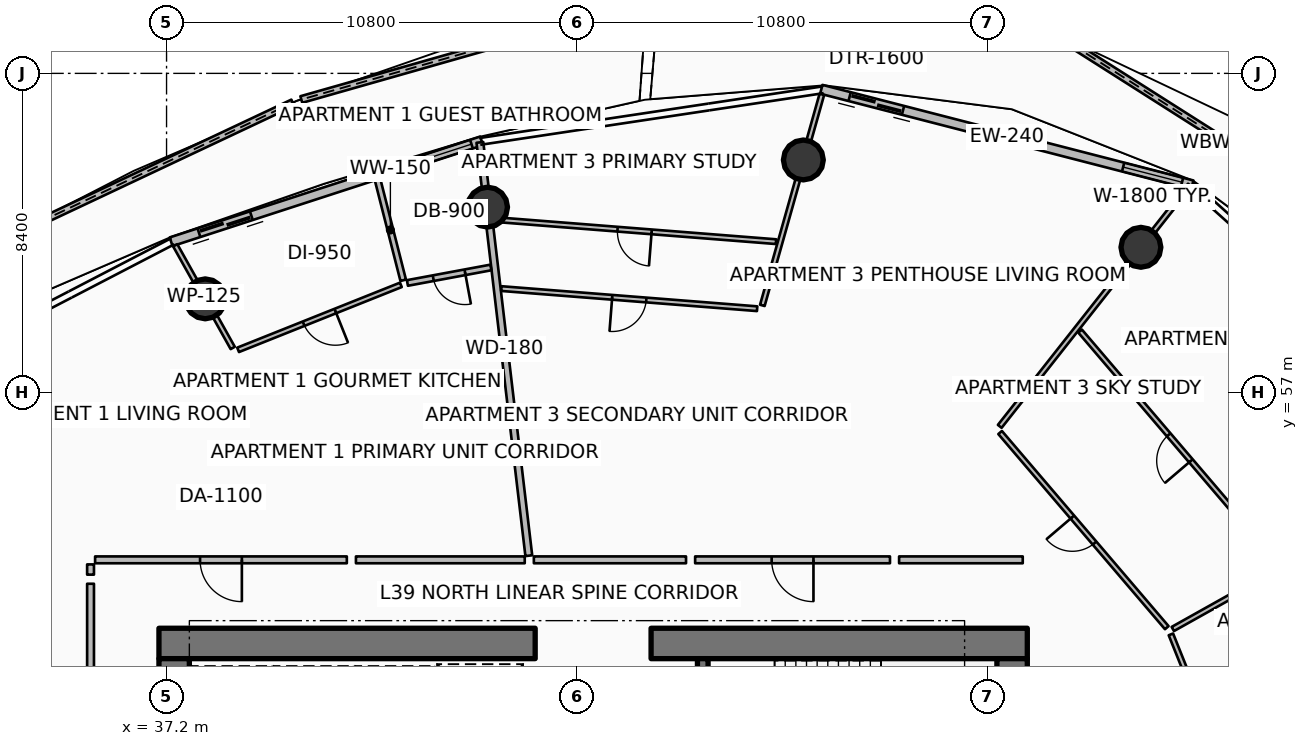
"""IFC4 building model, lengths in metres.
Left out: names, types, materials, properties, quantities, classifications, styles, units other than length and angle.
Written with IfcOpenShell. Run it as: python <this file> out.ifc"""

import sys

from ifc_helpers import new_model, si_unit, direction, frame, frame_2d, origin, origin_2d, place, context, subcontext, project, spatial, polyline, rectangle, circle, outline, extrude, element, fill, save


model = new_model("IFC4")
c1 = context("Model", 3, precision=1e-05, world=origin(), true_north=direction((0.0, 1.0)))
c2 = subcontext(c1, "Body", "Model", "MODEL_VIEW")
j1 = project(units=[si_unit("LENGTHUNIT", "METRE"), si_unit("PLANEANGLEUNIT", "RADIAN")], contexts=[c1])
p1 = place(None, origin())
s1 = spatial("IfcSite", under=j1, at=p1, CompositionType="ELEMENT")
p2 = place(p1, origin())
s2 = spatial("IfcBuilding", under=s1, at=p2, CompositionType="ELEMENT")
p3 = place(p2, frame((0.0, 0.0, 157.8)))
s3 = spatial("IfcBuildingStorey", under=s2, at=p3, CompositionType="ELEMENT", Elevation=157.8)
p4 = place(p3, frame((37.0, 50.4, 0.0), z_axis=(0.0, 0.0, 1.0), x_axis=(1.0, 0.0, 0.0)))
e1 = element("IfcWall", 1, at=p4, inside=s3, PredefinedType="SHEAR", context=c2, shape_type="SweptSolid", body=[
    extrude(rectangle(XDim=9.9, YDim=0.8, at=frame_2d((4.95, 0.0))), origin(), (0.0, 0.0, 1.0), 3.75),
])
p5 = place(p3, frame((49.95, 50.4, 0.0), z_axis=(0.0, 0.0, 1.0), x_axis=(1.0, 0.0, 0.0)))
e2 = element("IfcWall", 2, at=p5, inside=s3, PredefinedType="SHEAR", context=c2, shape_type="SweptSolid", body=[
    extrude(rectangle(XDim=9.9, YDim=0.8, at=frame_2d((4.95, 0.0))), origin(), (0.0, 0.0, 1.0), 3.75),
])
for number, where, z_axis, x_axis in (
    (3, (37.4, 34.0, 0.0), (0.0, 0.0, 1.0), (0.0, 1.0, 0.0)),
    (4, (59.45, 34.0, 0.0), (0.0, 0.0, 1.0), (0.0, 1.0, 0.0)),
):
    element("IfcWall", number, at=place(p3, frame(where, z_axis=z_axis, x_axis=x_axis)), inside=s3, PredefinedType="SHEAR", context=c2, shape_type="SweptSolid", body=[
        extrude(rectangle(XDim=16.0, YDim=0.8, at=frame_2d((8.0, 0.0))), origin(), (0.0, 0.0, 1.0), 3.75),
    ])
p6 = place(p3, frame((51.31, 46.5, 0.0), z_axis=(0.0, 0.0, 1.0), x_axis=(0.0, 1.0, 0.0)))
e5 = element("IfcWall", 5, at=p6, inside=s3, PredefinedType="SHEAR", context=c2, shape_type="SweptSolid", body=[
    extrude(rectangle(XDim=3.5, YDim=0.28, at=frame_2d((1.75, 0.0))), origin(), (0.0, 0.0, 1.0), 3.75),
])
for number, where, z_axis, x_axis in (
    (6, (62.84, 60.824, 0.0), (0.0, 0.0, 1.0), (1.0, 0.0, 0.0)),
    (7, (53.957, 63.122, 0.0), (0.0, 0.0, 1.0), (1.0, 0.0, 0.0)),
    (8, (45.647, 61.881, 0.0), (0.0, 0.0, 1.0), (1.0, 0.0, 0.0)),
    (9, (38.218, 59.467, 0.0), (0.0, 0.0, 1.0), (1.0, 0.0, 0.0)),
):
    element("IfcColumn", number, at=place(p3, frame(where, z_axis=z_axis, x_axis=x_axis)), inside=s3, PredefinedType="COLUMN", context=c2, shape_type="SweptSolid", body=[
        extrude(circle(Radius=0.525, at=origin_2d()), origin(), (0.0, 0.0, 1.0), 3.5),
    ])
p7 = place(p3, frame((69.624, 60.698, 0.0), z_axis=(0.0, 0.0, 1.0), x_axis=(-0.844049978771, 0.536264518066, 0.0)))
e10 = element("IfcWall", 10, at=p7, inside=s3, PredefinedType="PARAPET", context=c2, shape_type="SweptSolid", body=[
    extrude(outline(polyline([(0.0, 0.0), (10.707, 0.0), (10.707, 1.632), (5.353, 1.418), (0.0, 1.233), (0.0, 0.0)])), frame((0.0, 0.09, 0.0), z_axis=(0.0, -1.0, 0.0), x_axis=(1.0, 0.0, 0.0)), (0.0, 0.0, 1.0), 0.18),
])
p8 = place(p3, frame((49.835, 67.296, 0.0), z_axis=(0.0, 0.0, 1.0), x_axis=(-0.961897452062, -0.27341048209, 0.0)))
e11 = element("IfcWall", 11, at=p8, inside=s3, PredefinedType="PARAPET", context=c2, shape_type="SweptSolid", body=[
    extrude(outline(polyline([(0.0, 0.0), (9.449, 0.0), (9.449, 1.632), (4.725, 1.798), (0.0, 1.86), (0.0, 0.0)])), frame((0.0, 0.09, 0.0), z_axis=(0.0, -1.0, 0.0), x_axis=(1.0, 0.0, 0.0)), (0.0, 0.0, 1.0), 0.18),
])
p9 = place(p3, frame((40.522, 64.628, 0.0), z_axis=(0.0, 0.0, 1.0), x_axis=(-0.904569140233, -0.42632695263, 0.0)))
e12 = element("IfcWall", 12, at=p9, inside=s3, PredefinedType="PARAPET", context=c2, shape_type="SweptSolid", body=[
    extrude(outline(polyline([(0.0, 0.0), (9.184, 0.0), (9.184, 1.233), (4.592, 1.418), (0.0, 1.632), (0.0, 0.0)])), frame((0.0, 0.09, 0.0), z_axis=(0.0, -1.0, 0.0), x_axis=(1.0, 0.0, 0.0)), (0.0, 0.0, 1.0), 0.18),
])
p10 = place(p3, frame((64.192, 62.466, 0.0), z_axis=(0.0, 0.0, 1.0), x_axis=(-0.968379685126, 0.249481032214, 0.0)))
e13 = element("IfcWall", 13, at=p10, inside=s3, PredefinedType="SOLIDWALL", context=c2, shape_type="SweptSolid", body=[
    extrude(rectangle(XDim=10.082, YDim=0.24, at=frame_2d((5.041, 0.0))), origin(), (0.0, 0.0, 1.0), 2.45),
])
p11 = place(p10, frame((7.862, 0.0, 0.0)))
e14 = element("IfcOpeningElement", 14, at=p11, cuts=e13, PredefinedType="OPENING", context=c2, shape_type="SweptSolid", body=[
    extrude(rectangle(XDim=1.45, YDim=2.15, at=frame_2d((0.725, 1.075))), frame((0.0, 0.13, 0.0), z_axis=(0.0, -1.0, 0.0), x_axis=(1.0, 0.0, 0.0)), (0.0, 0.0, 1.0), 0.26),
])
p12 = place(p10, frame((0.28, 0.0, 0.65)))
e15 = element("IfcOpeningElement", 15, at=p12, cuts=e13, PredefinedType="OPENING", context=c2, shape_type="SweptSolid", body=[
    extrude(rectangle(XDim=1.6, YDim=1.5, at=frame_2d((0.8, 0.75))), frame((0.0, 0.13, 0.0), z_axis=(0.0, -1.0, 0.0), x_axis=(1.0, 0.0, 0.0)), (0.0, 0.0, 1.0), 0.26),
])
p13 = place(p3, frame((45.49, 63.624, 0.0), z_axis=(0.0, 0.0, 1.0), x_axis=(-0.951046390632, -0.309048156224, 0.0)))
e16 = element("IfcWall", 16, at=p13, inside=s3, PredefinedType="SOLIDWALL", context=c2, shape_type="SweptSolid", body=[
    extrude(rectangle(XDim=8.59, YDim=0.24, at=frame_2d((4.295, 0.0))), origin(), (0.0, 0.0, 1.0), 2.45),
])
p14 = place(p13, frame((6.37, 0.0, 0.0)))
e17 = element("IfcOpeningElement", 17, at=p14, cuts=e16, PredefinedType="OPENING", context=c2, shape_type="SweptSolid", body=[
    extrude(rectangle(XDim=1.45, YDim=2.15, at=frame_2d((0.725, 1.075))), frame((0.0, 0.13, 0.0), z_axis=(0.0, -1.0, 0.0), x_axis=(1.0, 0.0, 0.0)), (0.0, 0.0, 1.0), 0.26),
])
p15 = place(p13, frame((0.28, 0.0, 0.65)))
e18 = element("IfcOpeningElement", 18, at=p15, cuts=e16, PredefinedType="OPENING", context=c2, shape_type="SweptSolid", body=[
    extrude(rectangle(XDim=1.6, YDim=1.5, at=frame_2d((0.8, 0.75))), frame((0.0, 0.13, 0.0), z_axis=(0.0, -1.0, 0.0), x_axis=(1.0, 0.0, 0.0)), (0.0, 0.0, 1.0), 0.26),
])
p16 = place(p3, frame((46.732, 52.709, 0.0), z_axis=(0.0, 0.0, 1.0), x_axis=(-0.117537145285, 0.993068486802, 0.0)))
e19 = element("IfcWall", 19, at=p16, inside=s3, PredefinedType="PARTITIONING", context=c2, shape_type="SweptSolid", body=[
    extrude(rectangle(XDim=10.951, YDim=0.18, at=frame_2d((5.475, 0.0))), origin(), (0.0, 0.0, 1.0), 2.94),
])
p17 = place(p3, frame((41.944, 52.6, 0.0), z_axis=(0.0, 0.0, 1.0), x_axis=(-1.0, 0.0, 0.0)))
e20 = element("IfcWall", 20, at=p17, inside=s3, PredefinedType="PARTITIONING", context=c2, shape_type="SweptSolid", body=[
    extrude(rectangle(XDim=6.624, YDim=0.18, at=frame_2d((3.312, 0.0))), origin(), (0.0, 0.0, 1.0), 2.94),
])
p18 = place(p17, frame((2.762, 0.0, 0.0)))
e21 = element("IfcOpeningElement", 21, at=p18, cuts=e20, PredefinedType="OPENING", context=c2, shape_type="SweptSolid", body=[
    extrude(rectangle(XDim=1.1, YDim=2.1, at=frame_2d((0.55, 1.05))), frame((0.0, 0.1, 0.0), z_axis=(0.0, -1.0, 0.0), x_axis=(1.0, 0.0, 0.0)), (0.0, 0.0, 1.0), 0.2),
])
p19 = place(p3, frame((35.2, 52.48, 0.0), z_axis=(0.0, 0.0, 1.0), x_axis=(0.0, -1.0, 0.0)))
e22 = element("IfcWall", 22, at=p19, inside=s3, PredefinedType="PARTITIONING", context=c2, shape_type="SweptSolid", body=[
    extrude(rectangle(XDim=0.269, YDim=0.18, at=frame_2d((0.135, 0.0))), origin(), (0.0, 0.0, 1.0), 2.94),
])
p20 = place(p3, frame((46.625, 52.6, 0.0), z_axis=(0.0, 0.0, 1.0), x_axis=(-1.0, 0.0, 0.0)))
e23 = element("IfcWall", 23, at=p20, inside=s3, PredefinedType="PARTITIONING", context=c2, shape_type="SweptSolid", body=[
    extrude(rectangle(XDim=4.442, YDim=0.18, at=frame_2d((2.221, 0.0))), origin(), (0.0, 0.0, 1.0), 2.94),
])
p21 = place(p3, frame((38.941, 58.175, 0.0), z_axis=(0.0, 0.0, 1.0), x_axis=(-0.488620181058, 0.872496600946, 0.0)))
e24 = element("IfcWall", 24, at=p21, inside=s3, PredefinedType="PARTITIONING", context=c2, shape_type="SweptSolid", body=[
    extrude(rectangle(XDim=3.095, YDim=0.125, at=frame_2d((1.548, 0.0))), origin(), (0.0, 0.0, 1.0), 2.94),
])
p22 = place(p3, frame((45.734, 60.293, 0.0), z_axis=(0.0, 0.0, 1.0), x_axis=(-0.983182569162, -0.182625397184, 0.0)))
e25 = element("IfcWall", 25, at=p22, inside=s3, PredefinedType="PARTITIONING", context=c2, shape_type="SweptSolid", body=[
    extrude(rectangle(XDim=2.234, YDim=0.15, at=frame_2d((1.117, 0.0))), origin(), (0.0, 0.0, 1.0), 2.94),
])
p23 = place(p22, frame((0.692, 0.0, 0.0)))
e26 = element("IfcOpeningElement", 26, at=p23, cuts=e25, PredefinedType="OPENING", context=c2, shape_type="SweptSolid", body=[
    extrude(rectangle(XDim=0.85, YDim=2.06, at=frame_2d((0.425, 1.03))), frame((0.0, 0.085, 0.0), z_axis=(0.0, -1.0, 0.0), x_axis=(1.0, 0.0, 0.0)), (0.0, 0.0, 1.0), 0.17),
])
p24 = place(p3, frame((43.427, 59.956, 0.0), z_axis=(0.0, 0.0, 1.0), x_axis=(-0.246779972966, 0.969071537578, 0.0)))
e27 = element("IfcWall", 27, at=p24, inside=s3, PredefinedType="PARTITIONING", context=c2, shape_type="SweptSolid", body=[
    extrude(rectangle(XDim=2.732, YDim=0.15, at=frame_2d((1.366, 0.0))), origin(), (0.0, 0.0, 1.0), 2.94),
])
p25 = place(p3, frame((43.366, 59.835, 0.0), z_axis=(0.0, 0.0, 1.0), x_axis=(-0.928691950022, -0.370852075584, 0.0)))
e28 = element("IfcWall", 28, at=p25, inside=s3, PredefinedType="PARTITIONING", context=c2, shape_type="SweptSolid", body=[
    extrude(rectangle(XDim=4.612, YDim=0.125, at=frame_2d((2.306, 0.0))), origin(), (0.0, 0.0, 1.0), 2.94),
])
p26 = place(p25, frame((1.856, 0.0, 0.0)))
e29 = element("IfcOpeningElement", 29, at=p26, cuts=e28, PredefinedType="OPENING", context=c2, shape_type="SweptSolid", body=[
    extrude(rectangle(XDim=0.9, YDim=2.08, at=frame_2d((0.45, 1.04))), frame((0.0, 0.073, 0.0), z_axis=(0.0, -1.0, 0.0), x_axis=(1.0, 0.0, 0.0)), (0.0, 0.0, 1.0), 0.145),
])
p27 = place(p3, frame((35.2, 51.971, 0.0), z_axis=(0.0, 0.0, 1.0), x_axis=(0.0, -1.0, 0.0)))
e30 = element("IfcWall", 30, at=p27, inside=s3, PredefinedType="PARTITIONING", context=c2, shape_type="SweptSolid", body=[
    extrude(rectangle(XDim=6.241, YDim=0.18, at=frame_2d((3.12, 0.0))), origin(), (0.0, 0.0, 1.0), 2.94),
])
p28 = place(p3, frame((56.236, 52.6, 0.0), z_axis=(0.0, 0.0, 1.0), x_axis=(-1.0, 0.0, 0.0)))
e31 = element("IfcWall", 31, at=p28, inside=s3, PredefinedType="PARTITIONING", context=c2, shape_type="SweptSolid", body=[
    extrude(rectangle(XDim=5.127, YDim=0.18, at=frame_2d((2.563, 0.0))), origin(), (0.0, 0.0, 1.0), 2.94),
])
p29 = place(p28, frame((2.013, 0.0, 0.0)))
e32 = element("IfcOpeningElement", 32, at=p29, cuts=e31, PredefinedType="OPENING", context=c2, shape_type="SweptSolid", body=[
    extrude(rectangle(XDim=1.1, YDim=2.1, at=frame_2d((0.55, 1.05))), frame((0.0, 0.1, 0.0), z_axis=(0.0, -1.0, 0.0), x_axis=(1.0, 0.0, 0.0)), (0.0, 0.0, 1.0), 0.2),
])
p30 = place(p3, frame((65.275, 46.532, 0.0), z_axis=(0.0, 0.0, 1.0), x_axis=(-0.372161107737, 0.928168147421, 0.0)))
e33 = element("IfcWall", 33, at=p30, inside=s3, PredefinedType="PARTITIONING", context=c2, shape_type="SweptSolid", body=[
    extrude(rectangle(XDim=4.425, YDim=0.125, at=frame_2d((2.212, 0.0))), origin(), (0.0, 0.0, 1.0), 2.94),
])
p31 = place(p30, frame((1.762, 0.0, 0.0)))
e34 = element("IfcOpeningElement", 34, at=p31, cuts=e33, PredefinedType="OPENING", context=c2, shape_type="SweptSolid", body=[
    extrude(rectangle(XDim=0.9, YDim=2.08, at=frame_2d((0.45, 1.04))), frame((0.0, 0.073, 0.0), z_axis=(0.0, -1.0, 0.0), x_axis=(1.0, 0.0, 0.0)), (0.0, 0.0, 1.0), 0.145),
])
p32 = place(p3, frame((59.73, 52.6, 0.0), z_axis=(0.0, 0.0, 1.0), x_axis=(-1.0, 0.0, 0.0)))
e35 = element("IfcWall", 35, at=p32, inside=s3, PredefinedType="PARTITIONING", context=c2, shape_type="SweptSolid", body=[
    extrude(rectangle(XDim=3.254, YDim=0.18, at=frame_2d((1.627, 0.0))), origin(), (0.0, 0.0, 1.0), 2.94),
])
p33 = place(p3, frame((63.679, 50.781, 0.0), z_axis=(0.0, 0.0, 1.0), x_axis=(0.872493265844, 0.488626136281, 0.0)))
e36 = element("IfcWall", 36, at=p33, inside=s3, PredefinedType="PARTITIONING", context=c2, shape_type="SweptSolid", body=[
    extrude(rectangle(XDim=8.816, YDim=0.125, at=frame_2d((4.408, 0.0))), origin(), (0.0, 0.0, 1.0), 2.94),
])
p34 = place(p3, frame((59.125, 56.112, 0.0), z_axis=(0.0, 0.0, 1.0), x_axis=(0.61910151414, 0.78531096719, 0.0)))
e37 = element("IfcWall", 37, at=p34, inside=s3, PredefinedType="PARTITIONING", context=c2, shape_type="SweptSolid", body=[
    extrude(rectangle(XDim=8.082, YDim=0.125, at=frame_2d((4.041, 0.0))), origin(), (0.0, 0.0, 1.0), 2.94),
])
p35 = place(p3, frame((63.52, 50.815, 0.0), z_axis=(0.0, 0.0, 1.0), x_axis=(-0.649447526186, 0.760406411553, 0.0)))
e38 = element("IfcWall", 38, at=p35, inside=s3, PredefinedType="PARTITIONING", context=c2, shape_type="SweptSolid", body=[
    extrude(rectangle(XDim=6.753, YDim=0.125, at=frame_2d((3.376, 0.0))), origin(), (0.0, 0.0, 1.0), 2.94),
])
p36 = place(p35, frame((2.926, 0.0, 0.0)))
e39 = element("IfcOpeningElement", 39, at=p36, cuts=e38, PredefinedType="OPENING", context=c2, shape_type="SweptSolid", body=[
    extrude(rectangle(XDim=0.9, YDim=2.08, at=frame_2d((0.45, 1.04))), frame((0.0, 0.073, 0.0), z_axis=(0.0, -1.0, 0.0), x_axis=(1.0, 0.0, 0.0)), (0.0, 0.0, 1.0), 0.145),
])
p37 = place(p3, frame((66.486, 52.476, 0.0), z_axis=(0.0, 0.0, 1.0), x_axis=(-0.649426515446, 0.760424355894, 0.0)))
e40 = element("IfcWall", 40, at=p37, inside=s3, PredefinedType="PARTITIONING", context=c2, shape_type="SweptSolid", body=[
    extrude(rectangle(XDim=8.079, YDim=0.125, at=frame_2d((4.04, 0.0))), origin(), (0.0, 0.0, 1.0), 2.94),
])
p38 = place(p37, frame((3.589, 0.0, 0.0)))
e41 = element("IfcOpeningElement", 41, at=p38, cuts=e40, PredefinedType="OPENING", context=c2, shape_type="SweptSolid", body=[
    extrude(rectangle(XDim=0.9, YDim=2.08, at=frame_2d((0.45, 1.04))), frame((0.0, 0.073, 0.0), z_axis=(0.0, -1.0, 0.0), x_axis=(1.0, 0.0, 0.0)), (0.0, 0.0, 1.0), 0.145),
])
p39 = place(p3, frame((50.869, 52.6, 0.0), z_axis=(0.0, 0.0, 1.0), x_axis=(-1.0, 0.0, 0.0)))
e42 = element("IfcWall", 42, at=p39, inside=s3, PredefinedType="PARTITIONING", context=c2, shape_type="SweptSolid", body=[
    extrude(rectangle(XDim=4.004, YDim=0.18, at=frame_2d((2.002, 0.0))), origin(), (0.0, 0.0, 1.0), 2.94),
])
p40 = place(p3, frame((52.878, 59.295, 0.0), z_axis=(0.0, 0.0, 1.0), x_axis=(0.271461170106, 0.962449392501, 0.0)))
e43 = element("IfcWall", 43, at=p40, inside=s3, PredefinedType="PARTITIONING", context=c2, shape_type="SweptSolid", body=[
    extrude(rectangle(XDim=5.769, YDim=0.125, at=frame_2d((2.885, 0.0))), origin(), (0.0, 0.0, 1.0), 2.94),
])
p41 = place(p3, frame((52.741, 59.208, 0.0), z_axis=(0.0, 0.0, 1.0), x_axis=(-0.996917452966, 0.078457580711, 0.0)))
e44 = element("IfcWall", 44, at=p41, inside=s3, PredefinedType="PARTITIONING", context=c2, shape_type="SweptSolid", body=[
    extrude(rectangle(XDim=6.752, YDim=0.125, at=frame_2d((3.376, 0.0))), origin(), (0.0, 0.0, 1.0), 2.94),
])
p42 = place(p41, frame((2.926, 0.0, 0.0)))
e45 = element("IfcOpeningElement", 45, at=p42, cuts=e44, PredefinedType="OPENING", context=c2, shape_type="SweptSolid", body=[
    extrude(rectangle(XDim=0.9, YDim=2.08, at=frame_2d((0.45, 1.04))), frame((0.0, 0.073, 0.0), z_axis=(0.0, -1.0, 0.0), x_axis=(1.0, 0.0, 0.0)), (0.0, 0.0, 1.0), 0.145),
])
p43 = place(p3, frame((53.239, 60.972, 0.0), z_axis=(0.0, 0.0, 1.0), x_axis=(-0.996916953075, 0.078463932292, 0.0)))
e46 = element("IfcWall", 46, at=p43, inside=s3, PredefinedType="PARTITIONING", context=c2, shape_type="SweptSolid", body=[
    extrude(rectangle(XDim=7.468, YDim=0.125, at=frame_2d((3.734, 0.0))), origin(), (0.0, 0.0, 1.0), 2.94),
])
p44 = place(p43, frame((3.284, 0.0, 0.0)))
e47 = element("IfcOpeningElement", 47, at=p44, cuts=e46, PredefinedType="OPENING", context=c2, shape_type="SweptSolid", body=[
    extrude(rectangle(XDim=0.9, YDim=2.08, at=frame_2d((0.45, 1.04))), frame((0.0, 0.073, 0.0), z_axis=(0.0, -1.0, 0.0), x_axis=(1.0, 0.0, 0.0)), (0.0, 0.0, 1.0), 0.145),
])
p45 = place(p11, origin())
e48 = element("IfcDoor", 48, at=p45, inside=s3, OperationType="DOUBLE_DOOR_SLIDING", PredefinedType="DOOR", context=c2, shape_type="SweptSolid", body=[
    extrude(rectangle(XDim=1.45, YDim=2.15, at=frame_2d((0.725, 1.075))), frame((0.0, 0.025, 0.0), z_axis=(0.0, -1.0, 0.0), x_axis=(1.0, 0.0, 0.0)), (0.0, 0.0, 1.0), 0.05),
])
fill(e14, e48)
p46 = place(p12, origin())
e49 = element("IfcWindow", 49, at=p46, inside=s3, PartitioningType="SINGLE_PANEL", PredefinedType="WINDOW", context=c2, shape_type="SweptSolid", body=[
    extrude(rectangle(XDim=1.6, YDim=1.5, at=frame_2d((0.8, 0.75))), frame((0.0, 0.03, 0.0), z_axis=(0.0, -1.0, 0.0), x_axis=(1.0, 0.0, 0.0)), (0.0, 0.0, 1.0), 0.06),
])
fill(e15, e49)
p47 = place(p14, origin())
e50 = element("IfcDoor", 50, at=p47, inside=s3, OperationType="DOUBLE_DOOR_SLIDING", PredefinedType="DOOR", context=c2, shape_type="SweptSolid", body=[
    extrude(rectangle(XDim=1.45, YDim=2.15, at=frame_2d((0.725, 1.075))), frame((0.0, 0.025, 0.0), z_axis=(0.0, -1.0, 0.0), x_axis=(1.0, 0.0, 0.0)), (0.0, 0.0, 1.0), 0.05),
])
fill(e17, e50)
p48 = place(p15, origin())
e51 = element("IfcWindow", 51, at=p48, inside=s3, PartitioningType="SINGLE_PANEL", PredefinedType="WINDOW", context=c2, shape_type="SweptSolid", body=[
    extrude(rectangle(XDim=1.6, YDim=1.5, at=frame_2d((0.8, 0.75))), frame((0.0, 0.03, 0.0), z_axis=(0.0, -1.0, 0.0), x_axis=(1.0, 0.0, 0.0)), (0.0, 0.0, 1.0), 0.06),
])
fill(e18, e51)
p49 = place(p18, origin())
e52 = element("IfcDoor", 52, at=p49, inside=s3, OperationType="SINGLE_SWING_LEFT", PredefinedType="DOOR", context=c2, shape_type="SweptSolid", body=[
    extrude(rectangle(XDim=1.1, YDim=2.1, at=frame_2d((0.55, 1.05))), frame((0.0, 0.025, 0.0), z_axis=(0.0, -1.0, 0.0), x_axis=(1.0, 0.0, 0.0)), (0.0, 0.0, 1.0), 0.05),
])
fill(e21, e52)
p50 = place(p23, origin())
e53 = element("IfcDoor", 53, at=p50, inside=s3, OperationType="SINGLE_SWING_LEFT", PredefinedType="DOOR", context=c2, shape_type="SweptSolid", body=[
    extrude(rectangle(XDim=0.85, YDim=2.06, at=frame_2d((0.425, 1.03))), frame((0.0, 0.025, 0.0), z_axis=(0.0, -1.0, 0.0), x_axis=(1.0, 0.0, 0.0)), (0.0, 0.0, 1.0), 0.05),
])
fill(e26, e53)
p51 = place(p26, origin())
e54 = element("IfcDoor", 54, at=p51, inside=s3, OperationType="SINGLE_SWING_LEFT", PredefinedType="DOOR", context=c2, shape_type="SweptSolid", body=[
    extrude(rectangle(XDim=0.9, YDim=2.08, at=frame_2d((0.45, 1.04))), frame((0.0, 0.025, 0.0), z_axis=(0.0, -1.0, 0.0), x_axis=(1.0, 0.0, 0.0)), (0.0, 0.0, 1.0), 0.05),
])
fill(e29, e54)
p52 = place(p29, origin())
e55 = element("IfcDoor", 55, at=p52, inside=s3, OperationType="SINGLE_SWING_LEFT", PredefinedType="DOOR", context=c2, shape_type="SweptSolid", body=[
    extrude(rectangle(XDim=1.1, YDim=2.1, at=frame_2d((0.55, 1.05))), frame((0.0, 0.025, 0.0), z_axis=(0.0, -1.0, 0.0), x_axis=(1.0, 0.0, 0.0)), (0.0, 0.0, 1.0), 0.05),
])
fill(e32, e55)
p53 = place(p36, origin())
e56 = element("IfcDoor", 56, at=p53, inside=s3, OperationType="SINGLE_SWING_RIGHT", PredefinedType="DOOR", context=c2, shape_type="SweptSolid", body=[
    extrude(rectangle(XDim=0.9, YDim=2.08, at=frame_2d((0.45, 1.04))), frame((0.0, 0.025, 0.0), z_axis=(0.0, -1.0, 0.0), x_axis=(1.0, 0.0, 0.0)), (0.0, 0.0, 1.0), 0.05),
])
fill(e39, e56)
p54 = place(p38, origin())
e57 = element("IfcDoor", 57, at=p54, inside=s3, OperationType="SINGLE_SWING_LEFT", PredefinedType="DOOR", context=c2, shape_type="SweptSolid", body=[
    extrude(rectangle(XDim=0.9, YDim=2.08, at=frame_2d((0.45, 1.04))), frame((0.0, 0.025, 0.0), z_axis=(0.0, -1.0, 0.0), x_axis=(1.0, 0.0, 0.0)), (0.0, 0.0, 1.0), 0.05),
])
fill(e41, e57)
p55 = place(p42, origin())
e58 = element("IfcDoor", 58, at=p55, inside=s3, OperationType="SINGLE_SWING_RIGHT", PredefinedType="DOOR", context=c2, shape_type="SweptSolid", body=[
    extrude(rectangle(XDim=0.9, YDim=2.08, at=frame_2d((0.45, 1.04))), frame((0.0, 0.025, 0.0), z_axis=(0.0, -1.0, 0.0), x_axis=(1.0, 0.0, 0.0)), (0.0, 0.0, 1.0), 0.05),
])
fill(e45, e58)
p56 = place(p44, origin())
e59 = element("IfcDoor", 59, at=p56, inside=s3, OperationType="SINGLE_SWING_LEFT", PredefinedType="DOOR", context=c2, shape_type="SweptSolid", body=[
    extrude(rectangle(XDim=0.9, YDim=2.08, at=frame_2d((0.45, 1.04))), frame((0.0, 0.025, 0.0), z_axis=(0.0, -1.0, 0.0), x_axis=(1.0, 0.0, 0.0)), (0.0, 0.0, 1.0), 0.05),
])
fill(e47, e59)
save(model, sys.argv[1])
